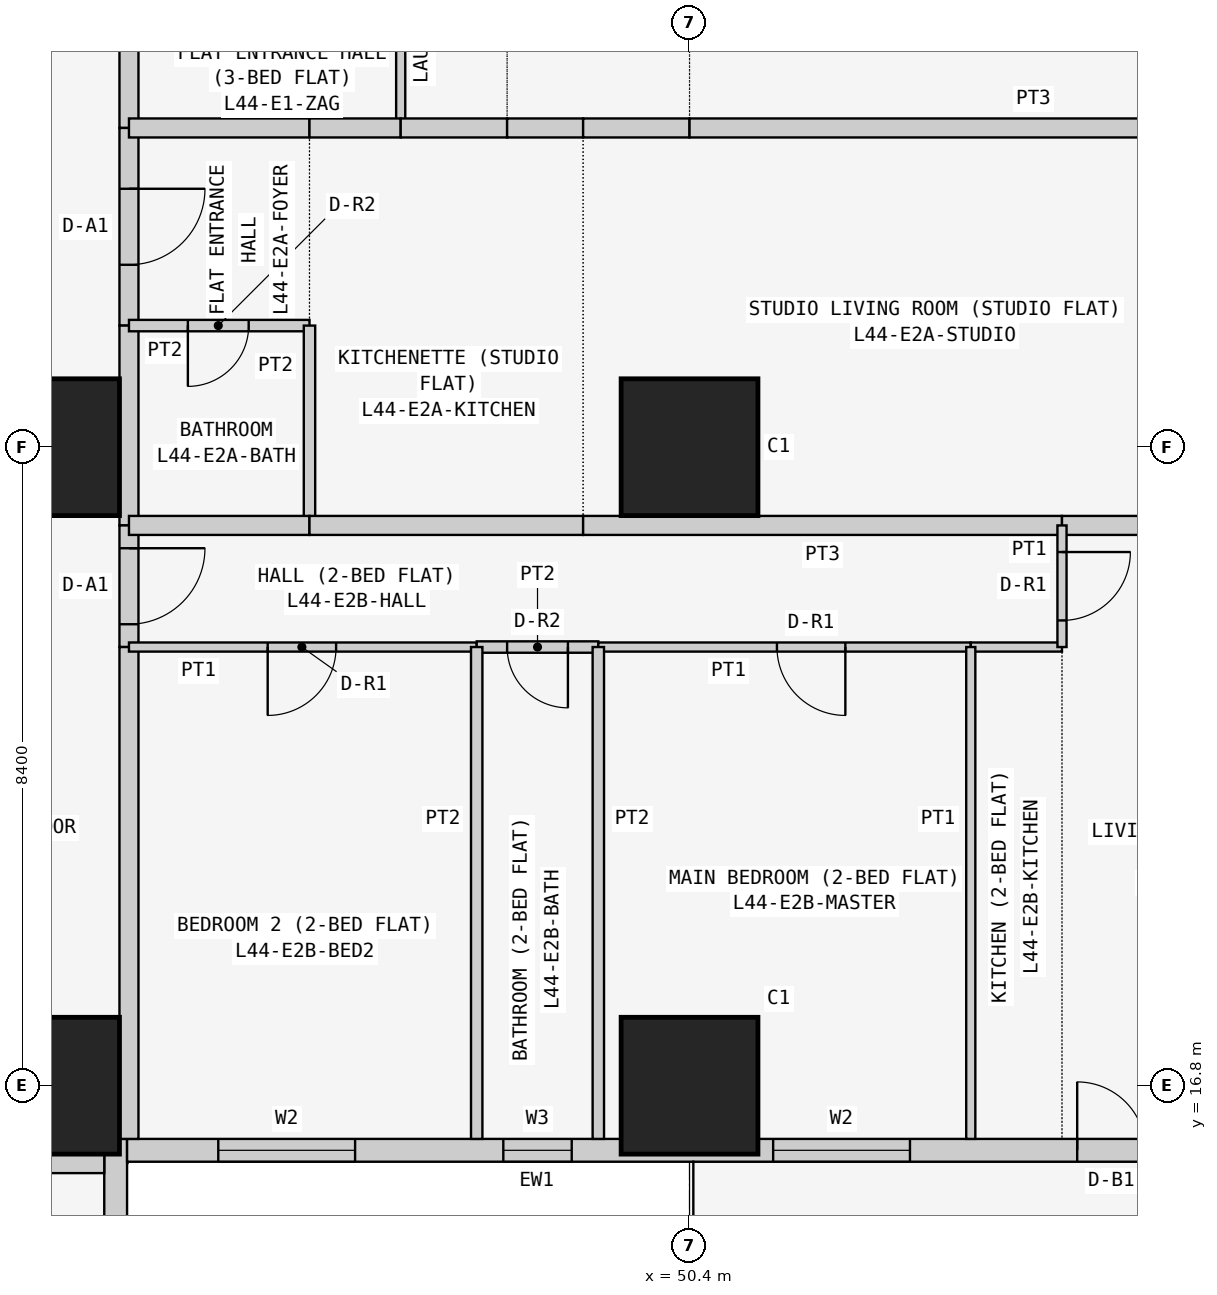
"""IFC4 building model, lengths in metres.
Left out: names, types, materials, properties, quantities, classifications, styles, units other than length and angle.
Written with IfcOpenShell. Run it as: python <this file> out.ifc"""

import sys

from ifc_helpers import new_model, si_unit, direction, frame, frame_2d, origin, origin_2d, place, context, subcontext, project, spatial, rectangle, extrude, element, fill, save


model = new_model("IFC4")
c1 = context("Model", 3, precision=1e-05, world=origin(), true_north=direction((0.0, 1.0)))
c2 = subcontext(c1, "Body", "Model", "MODEL_VIEW")
j1 = project(units=[si_unit("LENGTHUNIT", "METRE"), si_unit("PLANEANGLEUNIT", "RADIAN")], contexts=[c1])
p1 = place(None, origin())
s1 = spatial("IfcSite", under=j1, at=p1, CompositionType="ELEMENT")
p2 = place(p1, origin())
s2 = spatial("IfcBuilding", under=s1, at=p2, CompositionType="ELEMENT")
p3 = place(p2, frame((0.0, 0.0, 170.1)))
s3 = spatial("IfcBuildingStorey", under=s2, at=p3, CompositionType="ELEMENT", Elevation=170.1)
for number, where, z_axis, x_axis in (
    (1, (42.0, 16.8, 0.0), (0.0, 0.0, 1.0), (1.0, 0.0, 0.0)),
    (2, (42.0, 25.2, 0.0), (0.0, 0.0, 1.0), (1.0, 0.0, 0.0)),
    (3, (50.4, 16.8, 0.0), (0.0, 0.0, 1.0), (1.0, 0.0, 0.0)),
    (4, (50.4, 25.2, 0.0), (0.0, 0.0, 1.0), (1.0, 0.0, 0.0)),
):
    element("IfcColumn", number, at=place(p3, frame(where, z_axis=z_axis, x_axis=x_axis)), inside=s3, PredefinedType="COLUMN", context=c2, shape_type="SweptSolid", body=[
        extrude(rectangle(XDim=1.8, YDim=1.8, at=origin_2d()), origin(), (0.0, 0.0, 1.0), 3.6),
    ])
p4 = place(p3, frame((42.85, 8.8, 0.0), z_axis=(0.0, 0.0, 1.0), x_axis=(0.0, 1.0, 0.0)))
e5 = element("IfcWall", 5, at=p4, inside=s3, PredefinedType="SOLIDWALL", context=c2, shape_type="SweptSolid", body=[
    extrude(rectangle(XDim=7.3, YDim=0.3, at=frame_2d((3.65, 0.0))), origin(), (0.0, 0.0, 1.0), 3.45),
])
p5 = place(p4, frame((3.1, 0.0, 0.9)))
e6 = element("IfcOpeningElement", 6, at=p5, cuts=e5, PredefinedType="OPENING", context=c2, shape_type="SweptSolid", body=[
    extrude(rectangle(XDim=2.4, YDim=1.5, at=frame_2d((1.2, 0.75))), frame((0.0, 0.16, 0.0), z_axis=(0.0, -1.0, 0.0), x_axis=(1.0, 0.0, 0.0)), (0.0, 0.0, 1.0), 0.32),
])
p6 = place(p4, frame((0.75, 0.0, 0.9)))
e7 = element("IfcOpeningElement", 7, at=p6, cuts=e5, PredefinedType="OPENING", context=c2, shape_type="SweptSolid", body=[
    extrude(rectangle(XDim=1.2, YDim=1.5, at=frame_2d((0.6, 0.75))), frame((0.0, 0.16, 0.0), z_axis=(0.0, -1.0, 0.0), x_axis=(1.0, 0.0, 0.0)), (0.0, 0.0, 1.0), 0.32),
])
p7 = place(p3, frame((43.0, 15.95, 0.0), z_axis=(0.0, 0.0, 1.0), x_axis=(1.0, 0.0, 0.0)))
e8 = element("IfcWall", 8, at=p7, inside=s3, PredefinedType="SOLIDWALL", context=c2, shape_type="SweptSolid", body=[
    extrude(rectangle(XDim=15.4, YDim=0.3, at=frame_2d((7.7, 0.0))), origin(), (0.0, 0.0, 1.0), 3.45),
])
p8 = place(p7, frame((1.2, 0.0, 0.9)))
e9 = element("IfcOpeningElement", 9, at=p8, cuts=e8, PredefinedType="OPENING", context=c2, shape_type="SweptSolid", body=[
    extrude(rectangle(XDim=1.8, YDim=1.5, at=frame_2d((0.9, 0.75))), frame((0.0, 0.16, 0.0), z_axis=(0.0, -1.0, 0.0), x_axis=(1.0, 0.0, 0.0)), (0.0, 0.0, 1.0), 0.32),
])
p9 = place(p7, frame((4.95, 0.0, 1.5)))
e10 = element("IfcOpeningElement", 10, at=p9, cuts=e8, PredefinedType="OPENING", context=c2, shape_type="SweptSolid", body=[
    extrude(rectangle(XDim=0.9, YDim=0.7, at=frame_2d((0.45, 0.35))), frame((0.0, 0.16, 0.0), z_axis=(0.0, -1.0, 0.0), x_axis=(1.0, 0.0, 0.0)), (0.0, 0.0, 1.0), 0.32),
])
p10 = place(p7, frame((8.5, 0.0, 0.9)))
e11 = element("IfcOpeningElement", 11, at=p10, cuts=e8, PredefinedType="OPENING", context=c2, shape_type="SweptSolid", body=[
    extrude(rectangle(XDim=1.8, YDim=1.5, at=frame_2d((0.9, 0.75))), frame((0.0, 0.16, 0.0), z_axis=(0.0, -1.0, 0.0), x_axis=(1.0, 0.0, 0.0)), (0.0, 0.0, 1.0), 0.32),
])
p11 = place(p7, frame((12.5, 0.0, 0.0)))
e12 = element("IfcOpeningElement", 12, at=p11, cuts=e8, PredefinedType="OPENING", context=c2, shape_type="SweptSolid", body=[
    extrude(rectangle(XDim=0.9, YDim=2.4, at=frame_2d((0.45, 1.2))), frame((0.0, 0.16, 0.0), z_axis=(0.0, -1.0, 0.0), x_axis=(1.0, 0.0, 0.0)), (0.0, 0.0, 1.0), 0.32),
])
p12 = place(p7, frame((13.5, 0.0, 0.9)))
e13 = element("IfcOpeningElement", 13, at=p12, cuts=e8, PredefinedType="OPENING", context=c2, shape_type="SweptSolid", body=[
    extrude(rectangle(XDim=1.2, YDim=1.5, at=frame_2d((0.6, 0.75))), frame((0.0, 0.16, 0.0), z_axis=(0.0, -1.0, 0.0), x_axis=(1.0, 0.0, 0.0)), (0.0, 0.0, 1.0), 0.32),
])
p13 = place(p3, frame((43.025, 34.629, 0.0), z_axis=(0.0, 0.0, 1.0), x_axis=(0.0, -1.0, 0.0)))
e14 = element("IfcWall", 14, at=p13, inside=s3, PredefinedType="PARTITIONING", context=c2, shape_type="SweptSolid", body=[
    extrude(rectangle(XDim=5.229, YDim=0.25, at=frame_2d((2.615, 0.0))), origin(), (0.0, 0.0, 1.0), 3.45),
])
p14 = place(p13, frame((2.129, 0.0, 0.0)))
e15 = element("IfcOpeningElement", 15, at=p14, cuts=e14, PredefinedType="OPENING", context=c2, shape_type="SweptSolid", body=[
    extrude(rectangle(XDim=1.0, YDim=2.1, at=frame_2d((0.5, 1.05))), frame((0.0, 0.135, 0.0), z_axis=(0.0, -1.0, 0.0), x_axis=(1.0, 0.0, 0.0)), (0.0, 0.0, 1.0), 0.27),
])
p15 = place(p3, frame((43.025, 29.4, 0.0), z_axis=(0.0, 0.0, 1.0), x_axis=(0.0, -1.0, 0.0)))
e16 = element("IfcWall", 16, at=p15, inside=s3, PredefinedType="PARTITIONING", context=c2, shape_type="SweptSolid", body=[
    extrude(rectangle(XDim=2.6, YDim=0.25, at=frame_2d((1.3, 0.0))), origin(), (0.0, 0.0, 1.0), 3.45),
])
p16 = place(p15, frame((0.8, 0.0, 0.0)))
e17 = element("IfcOpeningElement", 17, at=p16, cuts=e16, PredefinedType="OPENING", context=c2, shape_type="SweptSolid", body=[
    extrude(rectangle(XDim=1.0, YDim=2.1, at=frame_2d((0.5, 1.05))), frame((0.0, 0.135, 0.0), z_axis=(0.0, -1.0, 0.0), x_axis=(1.0, 0.0, 0.0)), (0.0, 0.0, 1.0), 0.27),
])
p17 = place(p3, frame((43.025, 26.8, 0.0), z_axis=(0.0, 0.0, 1.0), x_axis=(0.0, -1.0, 0.0)))
e18 = element("IfcWall", 18, at=p17, inside=s3, PredefinedType="PARTITIONING", context=c2, shape_type="SweptSolid", body=[
    extrude(rectangle(XDim=2.629, YDim=0.25, at=frame_2d((1.314, 0.0))), origin(), (0.0, 0.0, 1.0), 3.45),
])
p18 = place(p3, frame((43.025, 24.171, 0.0), z_axis=(0.0, 0.0, 1.0), x_axis=(0.0, -1.0, 0.0)))
e19 = element("IfcWall", 19, at=p18, inside=s3, PredefinedType="PARTITIONING", context=c2, shape_type="SweptSolid", body=[
    extrude(rectangle(XDim=1.6, YDim=0.25, at=frame_2d((0.8, 0.0))), origin(), (0.0, 0.0, 1.0), 3.45),
])
p19 = place(p18, frame((0.3, 0.0, 0.0)))
e20 = element("IfcOpeningElement", 20, at=p19, cuts=e19, PredefinedType="OPENING", context=c2, shape_type="SweptSolid", body=[
    extrude(rectangle(XDim=1.0, YDim=2.1, at=frame_2d((0.5, 1.05))), frame((0.0, 0.135, 0.0), z_axis=(0.0, -1.0, 0.0), x_axis=(1.0, 0.0, 0.0)), (0.0, 0.0, 1.0), 0.27),
])
p20 = place(p3, frame((43.025, 22.571, 0.0), z_axis=(0.0, 0.0, 1.0), x_axis=(0.0, -1.0, 0.0)))
e21 = element("IfcWall", 21, at=p20, inside=s3, PredefinedType="PARTITIONING", context=c2, shape_type="SweptSolid", body=[
    extrude(rectangle(XDim=6.471, YDim=0.25, at=frame_2d((3.235, 0.0))), origin(), (0.0, 0.0, 1.0), 3.45),
])
p21 = place(p3, frame((42.7, 15.775, 0.0), z_axis=(0.0, 0.0, 1.0), x_axis=(-1.0, 0.0, 0.0)))
e22 = element("IfcWall", 22, at=p21, inside=s3, PredefinedType="PARTITIONING", context=c2, shape_type="SweptSolid", body=[
    extrude(rectangle(XDim=6.871, YDim=0.25, at=frame_2d((3.436, 0.0))), origin(), (0.0, 0.0, 1.0), 3.45),
])
p22 = place(p3, frame((46.6, 29.4, 0.0), z_axis=(0.0, 0.0, 1.0), x_axis=(0.0, 1.0, 0.0)))
e23 = element("IfcWall", 23, at=p22, inside=s3, PredefinedType="PARTITIONING", context=c2, shape_type="SweptSolid", body=[
    extrude(rectangle(XDim=5.229, YDim=0.12, at=frame_2d((2.615, 0.0))), origin(), (0.0, 0.0, 1.0), 3.45),
])
p23 = place(p3, frame((43.025, 29.4, 0.0), z_axis=(0.0, 0.0, 1.0), x_axis=(1.0, 0.0, 0.0)))
e24 = element("IfcWall", 24, at=p23, inside=s3, PredefinedType="PARTITIONING", context=c2, shape_type="SweptSolid", body=[
    extrude(rectangle(XDim=2.375, YDim=0.25, at=frame_2d((1.188, 0.0))), origin(), (0.0, 0.0, 1.0), 3.45),
])
p24 = place(p3, frame((45.4, 29.4, 0.0), z_axis=(0.0, 0.0, 1.0), x_axis=(1.0, 0.0, 0.0)))
e25 = element("IfcWall", 25, at=p24, inside=s3, PredefinedType="PARTITIONING", context=c2, shape_type="SweptSolid", body=[
    extrude(rectangle(XDim=1.2, YDim=0.25, at=frame_2d((0.6, 0.0))), origin(), (0.0, 0.0, 1.0), 3.45),
])
p25 = place(p3, frame((46.6, 29.4, 0.0), z_axis=(0.0, 0.0, 1.0), x_axis=(1.0, 0.0, 0.0)))
e26 = element("IfcWall", 26, at=p25, inside=s3, PredefinedType="PARTITIONING", context=c2, shape_type="SweptSolid", body=[
    extrude(rectangle(XDim=1.4, YDim=0.25, at=frame_2d((0.7, 0.0))), origin(), (0.0, 0.0, 1.0), 3.45),
])
p26 = place(p3, frame((48.0, 29.4, 0.0), z_axis=(0.0, 0.0, 1.0), x_axis=(1.0, 0.0, 0.0)))
e27 = element("IfcWall", 27, at=p26, inside=s3, PredefinedType="PARTITIONING", context=c2, shape_type="SweptSolid", body=[
    extrude(rectangle(XDim=1.0, YDim=0.25, at=frame_2d((0.5, 0.0))), origin(), (0.0, 0.0, 1.0), 3.45),
])
p27 = place(p3, frame((49.0, 29.4, 0.0), z_axis=(0.0, 0.0, 1.0), x_axis=(1.0, 0.0, 0.0)))
e28 = element("IfcWall", 28, at=p27, inside=s3, PredefinedType="PARTITIONING", context=c2, shape_type="SweptSolid", body=[
    extrude(rectangle(XDim=1.4, YDim=0.25, at=frame_2d((0.7, 0.0))), origin(), (0.0, 0.0, 1.0), 3.45),
])
p28 = place(p3, frame((50.4, 29.4, 0.0), z_axis=(0.0, 0.0, 1.0), x_axis=(1.0, 0.0, 0.0)))
e29 = element("IfcWall", 29, at=p28, inside=s3, PredefinedType="PARTITIONING", context=c2, shape_type="SweptSolid", body=[
    extrude(rectangle(XDim=9.05, YDim=0.25, at=frame_2d((4.525, 0.0))), origin(), (0.0, 0.0, 1.0), 3.45),
])
p29 = place(p3, frame((45.4, 26.8, 0.0), z_axis=(0.0, 0.0, 1.0), x_axis=(-1.0, 0.0, 0.0)))
e30 = element("IfcWall", 30, at=p29, inside=s3, PredefinedType="PARTITIONING", context=c2, shape_type="SweptSolid", body=[
    extrude(rectangle(XDim=2.375, YDim=0.15, at=frame_2d((1.188, 0.0))), origin(), (0.0, 0.0, 1.0), 3.45),
])
p30 = place(p29, frame((0.8, 0.0, 0.0)))
e31 = element("IfcOpeningElement", 31, at=p30, cuts=e30, PredefinedType="OPENING", context=c2, shape_type="SweptSolid", body=[
    extrude(rectangle(XDim=0.8, YDim=2.1, at=frame_2d((0.4, 1.05))), frame((0.0, 0.085, 0.0), z_axis=(0.0, -1.0, 0.0), x_axis=(1.0, 0.0, 0.0)), (0.0, 0.0, 1.0), 0.17),
])
p31 = place(p3, frame((45.4, 26.8, 0.0), z_axis=(0.0, 0.0, 1.0), x_axis=(0.0, -1.0, 0.0)))
e32 = element("IfcWall", 32, at=p31, inside=s3, PredefinedType="PARTITIONING", context=c2, shape_type="SweptSolid", body=[
    extrude(rectangle(XDim=2.629, YDim=0.15, at=frame_2d((1.314, 0.0))), origin(), (0.0, 0.0, 1.0), 3.45),
])
p32 = place(p3, frame((45.4, 24.171, 0.0), z_axis=(0.0, 0.0, 1.0), x_axis=(-1.0, 0.0, 0.0)))
e33 = element("IfcWall", 33, at=p32, inside=s3, PredefinedType="PARTITIONING", context=c2, shape_type="SweptSolid", body=[
    extrude(rectangle(XDim=2.375, YDim=0.25, at=frame_2d((1.188, 0.0))), origin(), (0.0, 0.0, 1.0), 3.45),
])
p33 = place(p3, frame((49.0, 24.171, 0.0), z_axis=(0.0, 0.0, 1.0), x_axis=(-1.0, 0.0, 0.0)))
e34 = element("IfcWall", 34, at=p33, inside=s3, PredefinedType="PARTITIONING", context=c2, shape_type="SweptSolid", body=[
    extrude(rectangle(XDim=3.6, YDim=0.25, at=frame_2d((1.8, 0.0))), origin(), (0.0, 0.0, 1.0), 3.45),
])
p34 = place(p3, frame((55.3, 24.171, 0.0), z_axis=(0.0, 0.0, 1.0), x_axis=(-1.0, 0.0, 0.0)))
e35 = element("IfcWall", 35, at=p34, inside=s3, PredefinedType="PARTITIONING", context=c2, shape_type="SweptSolid", body=[
    extrude(rectangle(XDim=6.3, YDim=0.25, at=frame_2d((3.15, 0.0))), origin(), (0.0, 0.0, 1.0), 3.45),
])
p35 = place(p3, frame((59.45, 24.171, 0.0), z_axis=(0.0, 0.0, 1.0), x_axis=(-1.0, 0.0, 0.0)))
e36 = element("IfcWall", 36, at=p35, inside=s3, PredefinedType="PARTITIONING", context=c2, shape_type="SweptSolid", body=[
    extrude(rectangle(XDim=4.15, YDim=0.25, at=frame_2d((2.075, 0.0))), origin(), (0.0, 0.0, 1.0), 3.45),
])
p36 = place(p3, frame((47.6, 22.571, 0.0), z_axis=(0.0, 0.0, 1.0), x_axis=(-1.0, 0.0, 0.0)))
e37 = element("IfcWall", 37, at=p36, inside=s3, PredefinedType="PARTITIONING", context=c2, shape_type="SweptSolid", body=[
    extrude(rectangle(XDim=4.575, YDim=0.12, at=frame_2d((2.288, 0.0))), origin(), (0.0, 0.0, 1.0), 3.45),
])
p37 = place(p36, frame((1.85, 0.0, 0.0)))
e38 = element("IfcOpeningElement", 38, at=p37, cuts=e37, PredefinedType="OPENING", context=c2, shape_type="SweptSolid", body=[
    extrude(rectangle(XDim=0.9, YDim=2.1, at=frame_2d((0.45, 1.05))), frame((0.0, 0.07, 0.0), z_axis=(0.0, -1.0, 0.0), x_axis=(1.0, 0.0, 0.0)), (0.0, 0.0, 1.0), 0.14),
])
p38 = place(p3, frame((49.2, 22.571, 0.0), z_axis=(0.0, 0.0, 1.0), x_axis=(-1.0, 0.0, 0.0)))
e39 = element("IfcWall", 39, at=p38, inside=s3, PredefinedType="PARTITIONING", context=c2, shape_type="SweptSolid", body=[
    extrude(rectangle(XDim=1.6, YDim=0.15, at=frame_2d((0.8, 0.0))), origin(), (0.0, 0.0, 1.0), 3.45),
])
p39 = place(p38, frame((0.4, 0.0, 0.0)))
e40 = element("IfcOpeningElement", 40, at=p39, cuts=e39, PredefinedType="OPENING", context=c2, shape_type="SweptSolid", body=[
    extrude(rectangle(XDim=0.8, YDim=2.1, at=frame_2d((0.4, 1.05))), frame((0.0, 0.085, 0.0), z_axis=(0.0, -1.0, 0.0), x_axis=(1.0, 0.0, 0.0)), (0.0, 0.0, 1.0), 0.17),
])
p40 = place(p3, frame((54.1, 22.571, 0.0), z_axis=(0.0, 0.0, 1.0), x_axis=(-1.0, 0.0, 0.0)))
e41 = element("IfcWall", 41, at=p40, inside=s3, PredefinedType="PARTITIONING", context=c2, shape_type="SweptSolid", body=[
    extrude(rectangle(XDim=4.9, YDim=0.12, at=frame_2d((2.45, 0.0))), origin(), (0.0, 0.0, 1.0), 3.45),
])
p41 = place(p40, frame((1.65, 0.0, 0.0)))
e42 = element("IfcOpeningElement", 42, at=p41, cuts=e41, PredefinedType="OPENING", context=c2, shape_type="SweptSolid", body=[
    extrude(rectangle(XDim=0.9, YDim=2.1, at=frame_2d((0.45, 1.05))), frame((0.0, 0.07, 0.0), z_axis=(0.0, -1.0, 0.0), x_axis=(1.0, 0.0, 0.0)), (0.0, 0.0, 1.0), 0.14),
])
p42 = place(p3, frame((55.3, 22.571, 0.0), z_axis=(0.0, 0.0, 1.0), x_axis=(-1.0, 0.0, 0.0)))
e43 = element("IfcWall", 43, at=p42, inside=s3, PredefinedType="PARTITIONING", context=c2, shape_type="SweptSolid", body=[
    extrude(rectangle(XDim=1.2, YDim=0.12, at=frame_2d((0.6, 0.0))), origin(), (0.0, 0.0, 1.0), 3.45),
])
p43 = place(p3, frame((55.3, 24.171, 0.0), z_axis=(0.0, 0.0, 1.0), x_axis=(0.0, -1.0, 0.0)))
e44 = element("IfcWall", 44, at=p43, inside=s3, PredefinedType="PARTITIONING", context=c2, shape_type="SweptSolid", body=[
    extrude(rectangle(XDim=1.6, YDim=0.12, at=frame_2d((0.8, 0.0))), origin(), (0.0, 0.0, 1.0), 3.45),
])
p44 = place(p43, frame((0.35, 0.0, 0.0)))
e45 = element("IfcOpeningElement", 45, at=p44, cuts=e44, PredefinedType="OPENING", context=c2, shape_type="SweptSolid", body=[
    extrude(rectangle(XDim=0.9, YDim=2.1, at=frame_2d((0.45, 1.05))), frame((0.0, 0.07, 0.0), z_axis=(0.0, -1.0, 0.0), x_axis=(1.0, 0.0, 0.0)), (0.0, 0.0, 1.0), 0.14),
])
for number, where, z_axis, x_axis in (
    (46, (47.6, 22.571, 0.0), (0.0, 0.0, 1.0), (0.0, -1.0, 0.0)),
    (47, (49.2, 22.571, 0.0), (0.0, 0.0, 1.0), (0.0, -1.0, 0.0)),
):
    element("IfcWall", number, at=place(p3, frame(where, z_axis=z_axis, x_axis=x_axis)), inside=s3, PredefinedType="PARTITIONING", context=c2, shape_type="SweptSolid", body=[
        extrude(rectangle(XDim=6.471, YDim=0.15, at=frame_2d((3.235, 0.0))), origin(), (0.0, 0.0, 1.0), 3.45),
    ])
p45 = place(p3, frame((54.1, 22.571, 0.0), z_axis=(0.0, 0.0, 1.0), x_axis=(0.0, -1.0, 0.0)))
e48 = element("IfcWall", 48, at=p45, inside=s3, PredefinedType="PARTITIONING", context=c2, shape_type="SweptSolid", body=[
    extrude(rectangle(XDim=6.471, YDim=0.12, at=frame_2d((3.235, 0.0))), origin(), (0.0, 0.0, 1.0), 3.45),
])
p46 = place(p8, origin())
e49 = element("IfcWindow", 49, at=p46, inside=s3, PartitioningType="SINGLE_PANEL", PredefinedType="WINDOW", context=c2, shape_type="SweptSolid", body=[
    extrude(rectangle(XDim=1.8, YDim=1.5, at=frame_2d((0.9, 0.75))), frame((0.0, 0.03, 0.0), z_axis=(0.0, -1.0, 0.0), x_axis=(1.0, 0.0, 0.0)), (0.0, 0.0, 1.0), 0.06),
])
fill(e9, e49)
p47 = place(p9, origin())
e50 = element("IfcWindow", 50, at=p47, inside=s3, PartitioningType="SINGLE_PANEL", PredefinedType="WINDOW", context=c2, shape_type="SweptSolid", body=[
    extrude(rectangle(XDim=0.9, YDim=0.7, at=frame_2d((0.45, 0.35))), frame((0.0, 0.03, 0.0), z_axis=(0.0, -1.0, 0.0), x_axis=(1.0, 0.0, 0.0)), (0.0, 0.0, 1.0), 0.06),
])
fill(e10, e50)
p48 = place(p10, origin())
e51 = element("IfcWindow", 51, at=p48, inside=s3, PartitioningType="SINGLE_PANEL", PredefinedType="WINDOW", context=c2, shape_type="SweptSolid", body=[
    extrude(rectangle(XDim=1.8, YDim=1.5, at=frame_2d((0.9, 0.75))), frame((0.0, 0.03, 0.0), z_axis=(0.0, -1.0, 0.0), x_axis=(1.0, 0.0, 0.0)), (0.0, 0.0, 1.0), 0.06),
])
fill(e11, e51)
p49 = place(p11, origin())
e52 = element("IfcDoor", 52, at=p49, inside=s3, OperationType="SINGLE_SWING_LEFT", PredefinedType="DOOR", context=c2, shape_type="SweptSolid", body=[
    extrude(rectangle(XDim=0.9, YDim=2.4, at=frame_2d((0.45, 1.2))), frame((0.0, 0.025, 0.0), z_axis=(0.0, -1.0, 0.0), x_axis=(1.0, 0.0, 0.0)), (0.0, 0.0, 1.0), 0.05),
])
fill(e12, e52)
p50 = place(p16, origin())
e53 = element("IfcDoor", 53, at=p50, inside=s3, OperationType="SINGLE_SWING_LEFT", PredefinedType="DOOR", context=c2, shape_type="SweptSolid", body=[
    extrude(rectangle(XDim=1.0, YDim=2.1, at=frame_2d((0.5, 1.05))), frame((0.0, 0.025, 0.0), z_axis=(0.0, -1.0, 0.0), x_axis=(1.0, 0.0, 0.0)), (0.0, 0.0, 1.0), 0.05),
])
fill(e17, e53)
p51 = place(p30, origin())
e54 = element("IfcDoor", 54, at=p51, inside=s3, OperationType="SINGLE_SWING_RIGHT", PredefinedType="DOOR", context=c2, shape_type="SweptSolid", body=[
    extrude(rectangle(XDim=0.8, YDim=2.1, at=frame_2d((0.4, 1.05))), frame((0.0, 0.025, 0.0), z_axis=(0.0, -1.0, 0.0), x_axis=(1.0, 0.0, 0.0)), (0.0, 0.0, 1.0), 0.05),
])
fill(e31, e54)
p52 = place(p19, origin())
e55 = element("IfcDoor", 55, at=p52, inside=s3, OperationType="SINGLE_SWING_LEFT", PredefinedType="DOOR", context=c2, shape_type="SweptSolid", body=[
    extrude(rectangle(XDim=1.0, YDim=2.1, at=frame_2d((0.5, 1.05))), frame((0.0, 0.025, 0.0), z_axis=(0.0, -1.0, 0.0), x_axis=(1.0, 0.0, 0.0)), (0.0, 0.0, 1.0), 0.05),
])
fill(e20, e55)
p53 = place(p37, origin())
e56 = element("IfcDoor", 56, at=p53, inside=s3, OperationType="SINGLE_SWING_RIGHT", PredefinedType="DOOR", context=c2, shape_type="SweptSolid", body=[
    extrude(rectangle(XDim=0.9, YDim=2.1, at=frame_2d((0.45, 1.05))), frame((0.0, 0.025, 0.0), z_axis=(0.0, -1.0, 0.0), x_axis=(1.0, 0.0, 0.0)), (0.0, 0.0, 1.0), 0.05),
])
fill(e38, e56)
p54 = place(p39, origin())
e57 = element("IfcDoor", 57, at=p54, inside=s3, OperationType="SINGLE_SWING_LEFT", PredefinedType="DOOR", context=c2, shape_type="SweptSolid", body=[
    extrude(rectangle(XDim=0.8, YDim=2.1, at=frame_2d((0.4, 1.05))), frame((0.0, 0.025, 0.0), z_axis=(0.0, -1.0, 0.0), x_axis=(1.0, 0.0, 0.0)), (0.0, 0.0, 1.0), 0.05),
])
fill(e40, e57)
p55 = place(p41, origin())
e58 = element("IfcDoor", 58, at=p55, inside=s3, OperationType="SINGLE_SWING_LEFT", PredefinedType="DOOR", context=c2, shape_type="SweptSolid", body=[
    extrude(rectangle(XDim=0.9, YDim=2.1, at=frame_2d((0.45, 1.05))), frame((0.0, 0.025, 0.0), z_axis=(0.0, -1.0, 0.0), x_axis=(1.0, 0.0, 0.0)), (0.0, 0.0, 1.0), 0.05),
])
fill(e42, e58)
p56 = place(p44, origin())
e59 = element("IfcDoor", 59, at=p56, inside=s3, OperationType="SINGLE_SWING_LEFT", PredefinedType="DOOR", context=c2, shape_type="SweptSolid", body=[
    extrude(rectangle(XDim=0.9, YDim=2.1, at=frame_2d((0.45, 1.05))), frame((0.0, 0.025, 0.0), z_axis=(0.0, -1.0, 0.0), x_axis=(1.0, 0.0, 0.0)), (0.0, 0.0, 1.0), 0.05),
])
fill(e45, e59)
save(model, sys.argv[1])
